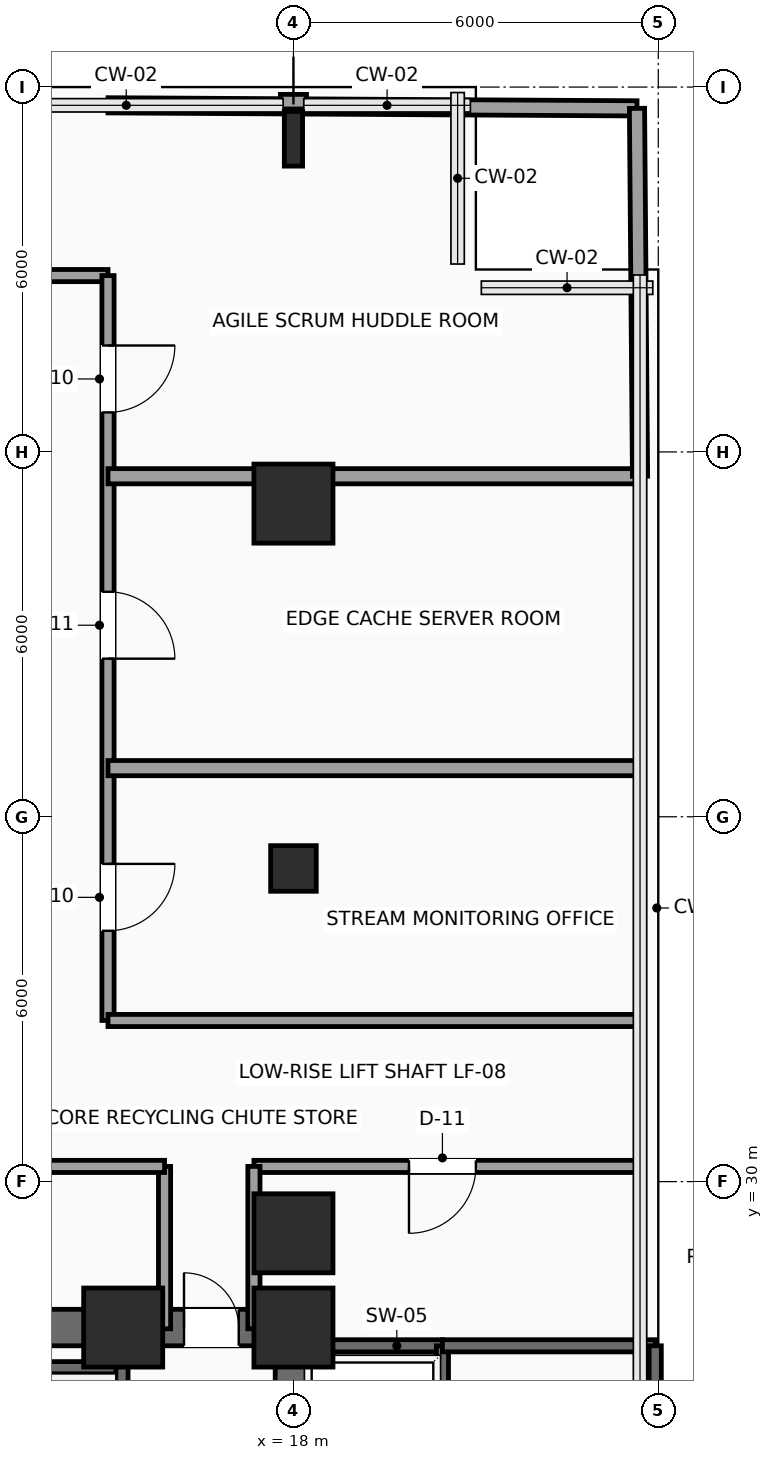
"""IFC4 building model, lengths in metres.
Left out: names, types, materials, properties, quantities, classifications, styles, units other than length and angle.
Written with IfcOpenShell. Run it as: python <this file> out.ifc"""

import sys

from ifc_helpers import new_model, si_unit, direction, frame, frame_2d, origin, origin_2d, place, context, subcontext, project, spatial, rectangle, hollow_rectangle, i_section, extrude, element, fill, save


model = new_model("IFC4")
c1 = context("Model", 3, precision=1e-05, world=origin(), true_north=direction((0.0, 1.0)))
c2 = subcontext(c1, "Body", "Model", "MODEL_VIEW")
j1 = project(units=[si_unit("LENGTHUNIT", "METRE"), si_unit("PLANEANGLEUNIT", "RADIAN")], contexts=[c1])
p1 = place(None, origin())
s1 = spatial("IfcSite", under=j1, at=p1, CompositionType="ELEMENT")
p2 = place(p1, origin())
s2 = spatial("IfcBuilding", under=s1, at=p2, CompositionType="ELEMENT")
p3 = place(p2, frame((0.0, 0.0, 79.2)))
s3 = spatial("IfcBuildingStorey", under=s2, at=p3, CompositionType="ELEMENT", Elevation=79.2)
for number, where, z_axis, x_axis in (
    (1, (15.2, 27.6, 0.0), (0.0, 0.0, 1.0), (1.0, 0.0, 0.0)),
    (2, (18.0, 27.6, 0.0), (0.0, 0.0, 1.0), (1.0, 0.0, 0.0)),
    (3, (18.0, 29.15, 0.0), (0.0, 0.0, 1.0), (1.0, 0.0, 0.0)),
):
    element("IfcColumn", number, at=place(p3, frame(where, z_axis=z_axis, x_axis=x_axis)), inside=s3, PredefinedType="COLUMN", context=c2, shape_type="SweptSolid", body=[
        extrude(rectangle(XDim=1.3, YDim=1.3, at=origin_2d()), origin(), (0.0, 0.0, 1.0), 3.9),
    ])
p4 = place(p3, frame((18.0, 35.15, 0.0), z_axis=(0.0, 0.0, 1.0), x_axis=(1.0, 0.0, 0.0)))
e4 = element("IfcColumn", 4, at=p4, inside=s3, PredefinedType="COLUMN", context=c2, shape_type="SweptSolid", body=[
    extrude(hollow_rectangle(XDim=0.75, YDim=0.75, WallThickness=0.035, InnerFilletRadius=0.035, OuterFilletRadius=0.05, at=origin_2d()), origin(), (0.0, 0.0, 1.0), 3.9),
])
p5 = place(p3, frame((18.0, 41.15, 0.0), z_axis=(0.0, 0.0, 1.0), x_axis=(1.0, 0.0, 0.0)))
e5 = element("IfcColumn", 5, at=p5, inside=s3, PredefinedType="COLUMN", context=c2, shape_type="SweptSolid", body=[
    extrude(rectangle(XDim=1.3, YDim=1.3, at=origin_2d()), origin(), (0.0, 0.0, 1.0), 3.9),
])
p6 = place(p3, frame((18.0, 47.15, 0.0), z_axis=(0.0, 0.0, 1.0), x_axis=(1.0, 0.0, 0.0)))
e6 = element("IfcColumn", 6, at=p6, inside=s3, PredefinedType="COLUMN", context=c2, shape_type="SweptSolid", body=[
    extrude(i_section(OverallWidth=0.3, OverallDepth=0.9, WebThickness=0.019, FlangeThickness=0.035, FilletRadius=0.03, at=origin_2d()), origin(), (0.0, 0.0, 1.0), 3.9),
])
p7 = place(p3, frame((17.785, 47.76, 0.0), z_axis=(0.0, 0.0, 1.0), x_axis=(1.0, 0.0, 0.0)))
e7 = element("IfcWall", 7, at=p7, inside=s3, PredefinedType="SOLIDWALL", context=c2, shape_type="SweptSolid", body=[
    extrude(rectangle(XDim=0.43, YDim=0.24, at=frame_2d((0.215, 0.0))), origin(), (0.0, 0.0, 1.0), 3.65),
])
p8 = place(p3, frame((6.0, 27.6, 0.0), z_axis=(0.0, 0.0, 1.0), x_axis=(1.0, 0.0, 0.0)))
e8 = element("IfcWall", 8, at=p8, inside=s3, PredefinedType="SHEAR", context=c2, shape_type="SweptSolid", body=[
    extrude(rectangle(XDim=12.0, YDim=0.6, at=frame_2d((6.0, 0.0))), origin(), (0.0, 0.0, 1.0), 3.65),
])
p9 = place(p8, frame((10.2, 0.0, 0.0)))
e9 = element("IfcOpeningElement", 9, at=p9, cuts=e8, PredefinedType="OPENING", context=c2, shape_type="SweptSolid", body=[
    extrude(rectangle(XDim=0.9, YDim=2.15, at=frame_2d((0.45, 1.075))), frame((0.0, 0.31, 0.0), z_axis=(0.0, -1.0, 0.0), x_axis=(1.0, 0.0, 0.0)), (0.0, 0.0, 1.0), 0.62),
])
p10 = place(p3, frame((18.0, 18.0, 0.0), z_axis=(0.0, 0.0, 1.0), x_axis=(0.0, 1.0, 0.0)))
e10 = element("IfcWall", 10, at=p10, inside=s3, PredefinedType="SHEAR", context=c2, shape_type="SweptSolid", body=[
    extrude(rectangle(XDim=9.6, YDim=0.6, at=frame_2d((4.8, 0.0))), origin(), (0.0, 0.0, 1.0), 3.65),
])
p11 = place(p3, frame((6.3, 26.94, 0.0), z_axis=(0.0, 0.0, 1.0), x_axis=(1.0, 0.0, 0.0)))
e11 = element("IfcWall", 11, at=p11, inside=s3, PredefinedType="SHEAR", context=c2, shape_type="SweptSolid", body=[
    extrude(rectangle(XDim=8.88, YDim=0.2, at=frame_2d((4.44, 0.0))), origin(), (0.0, 0.0, 1.0), 3.65),
])
p12 = place(p3, frame((15.18, 23.26, 0.0), z_axis=(0.0, 0.0, 1.0), x_axis=(0.0, 1.0, 0.0)))
e12 = element("IfcWall", 12, at=p12, inside=s3, PredefinedType="SHEAR", context=c2, shape_type="SweptSolid", body=[
    extrude(rectangle(XDim=4.04, YDim=0.2, at=frame_2d((2.02, 0.0))), origin(), (0.0, 0.0, 1.0), 3.65),
])
p13 = place(p3, frame((18.1, 27.3, 0.0), z_axis=(0.0, 0.0, 1.0), x_axis=(1.0, 0.0, 0.0)))
e13 = element("IfcWall", 13, at=p13, inside=s3, PredefinedType="SHEAR", context=c2, shape_type="SweptSolid", body=[
    extrude(rectangle(XDim=2.35, YDim=0.2, at=frame_2d((1.175, 0.0))), origin(), (0.0, 0.0, 1.0), 3.65),
])
p14 = place(p3, frame((20.45, 18.25, 0.0), z_axis=(0.0, 0.0, 1.0), x_axis=(0.0, 1.0, 0.0)))
e14 = element("IfcWall", 14, at=p14, inside=s3, PredefinedType="SHEAR", context=c2, shape_type="SweptSolid", body=[
    extrude(rectangle(XDim=9.05, YDim=0.2, at=frame_2d((4.525, 0.0))), origin(), (0.0, 0.0, 1.0), 3.65),
])
p15 = place(p14, frame((0.4, 0.0, 0.0)))
e15 = element("IfcOpeningElement", 15, at=p15, cuts=e14, PredefinedType="OPENING", context=c2, shape_type="SweptSolid", body=[
    extrude(rectangle(XDim=1.2, YDim=2.2, at=frame_2d((0.6, 1.1))), frame((0.0, 0.11, 0.0), z_axis=(0.0, -1.0, 0.0), x_axis=(1.0, 0.0, 0.0)), (0.0, 0.0, 1.0), 0.22),
])
p16 = place(p14, frame((2.65, 0.0, 0.0)))
e16 = element("IfcOpeningElement", 16, at=p16, cuts=e14, PredefinedType="OPENING", context=c2, shape_type="SweptSolid", body=[
    extrude(rectangle(XDim=1.2, YDim=2.2, at=frame_2d((0.6, 1.1))), frame((0.0, 0.11, 0.0), z_axis=(0.0, -1.0, 0.0), x_axis=(1.0, 0.0, 0.0)), (0.0, 0.0, 1.0), 0.22),
])
p17 = place(p14, frame((4.9, 0.0, 0.0)))
e17 = element("IfcOpeningElement", 17, at=p17, cuts=e14, PredefinedType="OPENING", context=c2, shape_type="SweptSolid", body=[
    extrude(rectangle(XDim=1.2, YDim=2.2, at=frame_2d((0.6, 1.1))), frame((0.0, 0.11, 0.0), z_axis=(0.0, -1.0, 0.0), x_axis=(1.0, 0.0, 0.0)), (0.0, 0.0, 1.0), 0.22),
])
p18 = place(p14, frame((7.15, 0.0, 0.0)))
e18 = element("IfcOpeningElement", 18, at=p18, cuts=e14, PredefinedType="OPENING", context=c2, shape_type="SweptSolid", body=[
    extrude(rectangle(XDim=1.2, YDim=2.2, at=frame_2d((0.6, 1.1))), frame((0.0, 0.11, 0.0), z_axis=(0.0, -1.0, 0.0), x_axis=(1.0, 0.0, 0.0)), (0.0, 0.0, 1.0), 0.22),
])
p19 = place(p3, frame((20.45, 27.3, 0.0), z_axis=(0.0, 0.0, 1.0), x_axis=(1.0, 0.0, 0.0)))
e19 = element("IfcWall", 19, at=p19, inside=s3, PredefinedType="SHEAR", context=c2, shape_type="SweptSolid", body=[
    extrude(rectangle(XDim=3.5, YDim=0.2, at=frame_2d((1.75, 0.0))), origin(), (0.0, 0.0, 1.0), 3.65),
])
p20 = place(p3, frame((23.95, 18.0, 0.0), z_axis=(0.0, 0.0, 1.0), x_axis=(0.0, 1.0, 0.0)))
e20 = element("IfcWall", 20, at=p20, inside=s3, PredefinedType="SHEAR", context=c2, shape_type="SweptSolid", body=[
    extrude(rectangle(XDim=9.3, YDim=0.2, at=frame_2d((4.65, 0.0))), origin(), (0.0, 0.0, 1.0), 3.65),
])
p21 = place(p3, frame((12.6, 44.9, 0.0), z_axis=(0.0, 0.0, 1.0), x_axis=(1.0, 0.0, 0.0)))
e21 = element("IfcWall", 21, at=p21, inside=s3, PredefinedType="PARTITIONING", context=c2, shape_type="SweptSolid", body=[
    extrude(rectangle(XDim=2.35, YDim=0.2, at=frame_2d((1.175, 0.0))), origin(), (0.0, 0.0, 1.0), 3.65),
])
p22 = place(p3, frame((14.95, 44.9, 0.0), z_axis=(0.0, 0.0, 1.0), x_axis=(0.0, -1.0, 0.0)))
e22 = element("IfcWall", 22, at=p22, inside=s3, PredefinedType="PARTITIONING", context=c2, shape_type="SweptSolid", body=[
    extrude(rectangle(XDim=12.25, YDim=0.2, at=frame_2d((6.125, 0.0))), origin(), (0.0, 0.0, 1.0), 3.65),
])
p23 = place(p22, frame((9.675, 0.0, 0.0)))
e23 = element("IfcOpeningElement", 23, at=p23, cuts=e22, PredefinedType="OPENING", context=c2, shape_type="SweptSolid", body=[
    extrude(rectangle(XDim=1.1, YDim=2.25, at=frame_2d((0.55, 1.125))), frame((0.0, 0.11, 0.0), z_axis=(0.0, -1.0, 0.0), x_axis=(1.0, 0.0, 0.0)), (0.0, 0.0, 1.0), 0.22),
])
p24 = place(p22, frame((5.2, 0.0, 0.0)))
e24 = element("IfcOpeningElement", 24, at=p24, cuts=e22, PredefinedType="OPENING", context=c2, shape_type="SweptSolid", body=[
    extrude(rectangle(XDim=1.1, YDim=2.25, at=frame_2d((0.55, 1.125))), frame((0.0, 0.11, 0.0), z_axis=(0.0, -1.0, 0.0), x_axis=(1.0, 0.0, 0.0)), (0.0, 0.0, 1.0), 0.22),
])
p25 = place(p22, frame((1.15, 0.0, 0.0)))
e25 = element("IfcOpeningElement", 25, at=p25, cuts=e22, PredefinedType="OPENING", context=c2, shape_type="SweptSolid", body=[
    extrude(rectangle(XDim=1.1, YDim=2.25, at=frame_2d((0.55, 1.125))), frame((0.0, 0.11, 0.0), z_axis=(0.0, -1.0, 0.0), x_axis=(1.0, 0.0, 0.0)), (0.0, 0.0, 1.0), 0.22),
])
p26 = place(p3, frame((14.95, 32.65, 0.0), z_axis=(0.0, 0.0, 1.0), x_axis=(1.0, 0.0, 0.0)))
e26 = element("IfcWall", 26, at=p26, inside=s3, PredefinedType="PARTITIONING", context=c2, shape_type="SweptSolid", body=[
    extrude(rectangle(XDim=8.75, YDim=0.2, at=frame_2d((4.375, 0.0))), origin(), (0.0, 0.0, 1.0), 3.65),
])
p27 = place(p3, frame((23.7, 30.25, 0.0), z_axis=(0.0, 0.0, 1.0), x_axis=(-1.0, 0.0, 0.0)))
e27 = element("IfcWall", 27, at=p27, inside=s3, PredefinedType="PARTITIONING", context=c2, shape_type="SweptSolid", body=[
    extrude(rectangle(XDim=6.35, YDim=0.2, at=frame_2d((3.175, 0.0))), origin(), (0.0, 0.0, 1.0), 3.65),
])
p28 = place(p27, frame((2.7, 0.0, 0.0)))
e28 = element("IfcOpeningElement", 28, at=p28, cuts=e27, PredefinedType="OPENING", context=c2, shape_type="SweptSolid", body=[
    extrude(rectangle(XDim=1.1, YDim=2.25, at=frame_2d((0.55, 1.125))), frame((0.0, 0.11, 0.0), z_axis=(0.0, -1.0, 0.0), x_axis=(1.0, 0.0, 0.0)), (0.0, 0.0, 1.0), 0.22),
])
for number, where, z_axis, x_axis in (
    (29, (17.35, 30.25, 0.0), (0.0, 0.0, 1.0), (0.0, -1.0, 0.0)),
    (30, (15.88, 27.58, 0.0), (0.0, 0.0, 1.0), (0.0, 1.0, 0.0)),
):
    element("IfcWall", number, at=place(p3, frame(where, z_axis=z_axis, x_axis=x_axis)), inside=s3, PredefinedType="PARTITIONING", context=c2, shape_type="SweptSolid", body=[
        extrude(rectangle(XDim=2.67, YDim=0.2, at=frame_2d((1.335, 0.0))), origin(), (0.0, 0.0, 1.0), 3.65),
    ])
p29 = place(p3, frame((15.88, 30.25, 0.0), z_axis=(0.0, 0.0, 1.0), x_axis=(-1.0, 0.0, 0.0)))
e31 = element("IfcWall", 31, at=p29, inside=s3, PredefinedType="PARTITIONING", context=c2, shape_type="SweptSolid", body=[
    extrude(rectangle(XDim=10.63, YDim=0.2, at=frame_2d((5.315, 0.0))), origin(), (0.0, 0.0, 1.0), 3.65),
])
p30 = place(p29, frame((6.13, 0.0, 0.0)))
e32 = element("IfcOpeningElement", 32, at=p30, cuts=e31, PredefinedType="OPENING", context=c2, shape_type="SweptSolid", body=[
    extrude(rectangle(XDim=0.9, YDim=2.1, at=frame_2d((0.45, 1.05))), frame((0.0, 0.11, 0.0), z_axis=(0.0, -1.0, 0.0), x_axis=(1.0, 0.0, 0.0)), (0.0, 0.0, 1.0), 0.22),
])
for number, where, z_axis, x_axis in (
    (33, (14.95, 36.8, 0.0), (0.0, 0.0, 1.0), (1.0, 0.0, 0.0)),
    (34, (14.95, 41.6, 0.0), (0.0, 0.0, 1.0), (1.0, 0.0, 0.0)),
):
    element("IfcWall", number, at=place(p3, frame(where, z_axis=z_axis, x_axis=x_axis)), inside=s3, PredefinedType="PARTITIONING", context=c2, shape_type="SweptSolid", body=[
        extrude(rectangle(XDim=8.75, YDim=0.25, at=frame_2d((4.375, 0.0))), origin(), (0.0, 0.0, 1.0), 3.65),
    ])
p31 = place(p3, frame((14.95, 47.7, 0.0), z_axis=(0.0, 0.0, 1.0), x_axis=(0.999983354582, -0.005769797172, 0.0)))
e35 = element("IfcWall", 35, at=p31, inside=s3, PredefinedType="PARTITIONING", context=c2, shape_type="SweptSolid", body=[
    extrude(rectangle(XDim=2.835, YDim=0.25, at=frame_2d((1.417, 0.0))), origin(), (0.0, 0.0, 1.0), 3.65),
])
p32 = place(p3, frame((18.215, 47.681, 0.0), z_axis=(0.0, 0.0, 1.0), x_axis=(0.999983469354, -0.005749871258, 0.0)))
e36 = element("IfcWall", 36, at=p32, inside=s3, PredefinedType="PARTITIONING", context=c2, shape_type="SweptSolid", body=[
    extrude(rectangle(XDim=5.435, YDim=0.25, at=frame_2d((2.717, 0.0))), origin(), (0.0, 0.0, 1.0), 3.65),
])
p33 = place(p3, frame((23.7, 41.6, 0.0), z_axis=(0.0, 0.0, 1.0), x_axis=(-0.008272517568, 0.999965782141, 0.0)))
e37 = element("IfcWall", 37, at=p33, inside=s3, PredefinedType="PARTITIONING", context=c2, shape_type="SweptSolid", body=[
    extrude(rectangle(XDim=6.05, YDim=0.25, at=frame_2d((3.025, 0.0))), origin(), (0.0, 0.0, 1.0), 3.65),
])
p34 = place(p9, origin())
e38 = element("IfcDoor", 38, at=p34, inside=s3, OperationType="SINGLE_SWING_LEFT", PredefinedType="DOOR", context=c2, shape_type="SweptSolid", body=[
    extrude(rectangle(XDim=0.9, YDim=2.15, at=frame_2d((0.45, 1.075))), frame((0.0, 0.025, 0.0), z_axis=(0.0, -1.0, 0.0), x_axis=(1.0, 0.0, 0.0)), (0.0, 0.0, 1.0), 0.05),
])
fill(e9, e38)
p35 = place(p23, origin())
e39 = element("IfcDoor", 39, at=p35, inside=s3, OperationType="SINGLE_SWING_LEFT", PredefinedType="DOOR", context=c2, shape_type="SweptSolid", body=[
    extrude(rectangle(XDim=1.1, YDim=2.25, at=frame_2d((0.55, 1.125))), frame((0.0, 0.025, 0.0), z_axis=(0.0, -1.0, 0.0), x_axis=(1.0, 0.0, 0.0)), (0.0, 0.0, 1.0), 0.05),
])
fill(e23, e39)
p36 = place(p24, origin())
e40 = element("IfcDoor", 40, at=p36, inside=s3, OperationType="SINGLE_SWING_RIGHT", PredefinedType="DOOR", context=c2, shape_type="SweptSolid", body=[
    extrude(rectangle(XDim=1.1, YDim=2.25, at=frame_2d((0.55, 1.125))), frame((0.0, 0.025, 0.0), z_axis=(0.0, -1.0, 0.0), x_axis=(1.0, 0.0, 0.0)), (0.0, 0.0, 1.0), 0.05),
])
fill(e24, e40)
p37 = place(p25, origin())
e41 = element("IfcDoor", 41, at=p37, inside=s3, OperationType="SINGLE_SWING_LEFT", PredefinedType="DOOR", context=c2, shape_type="SweptSolid", body=[
    extrude(rectangle(XDim=1.1, YDim=2.25, at=frame_2d((0.55, 1.125))), frame((0.0, 0.025, 0.0), z_axis=(0.0, -1.0, 0.0), x_axis=(1.0, 0.0, 0.0)), (0.0, 0.0, 1.0), 0.05),
])
fill(e25, e41)
p38 = place(p28, origin())
e42 = element("IfcDoor", 42, at=p38, inside=s3, OperationType="SINGLE_SWING_RIGHT", PredefinedType="DOOR", context=c2, shape_type="SweptSolid", body=[
    extrude(rectangle(XDim=1.1, YDim=2.25, at=frame_2d((0.55, 1.125))), frame((0.0, 0.025, 0.0), z_axis=(0.0, -1.0, 0.0), x_axis=(1.0, 0.0, 0.0)), (0.0, 0.0, 1.0), 0.05),
])
fill(e28, e42)
save(model, sys.argv[1])
